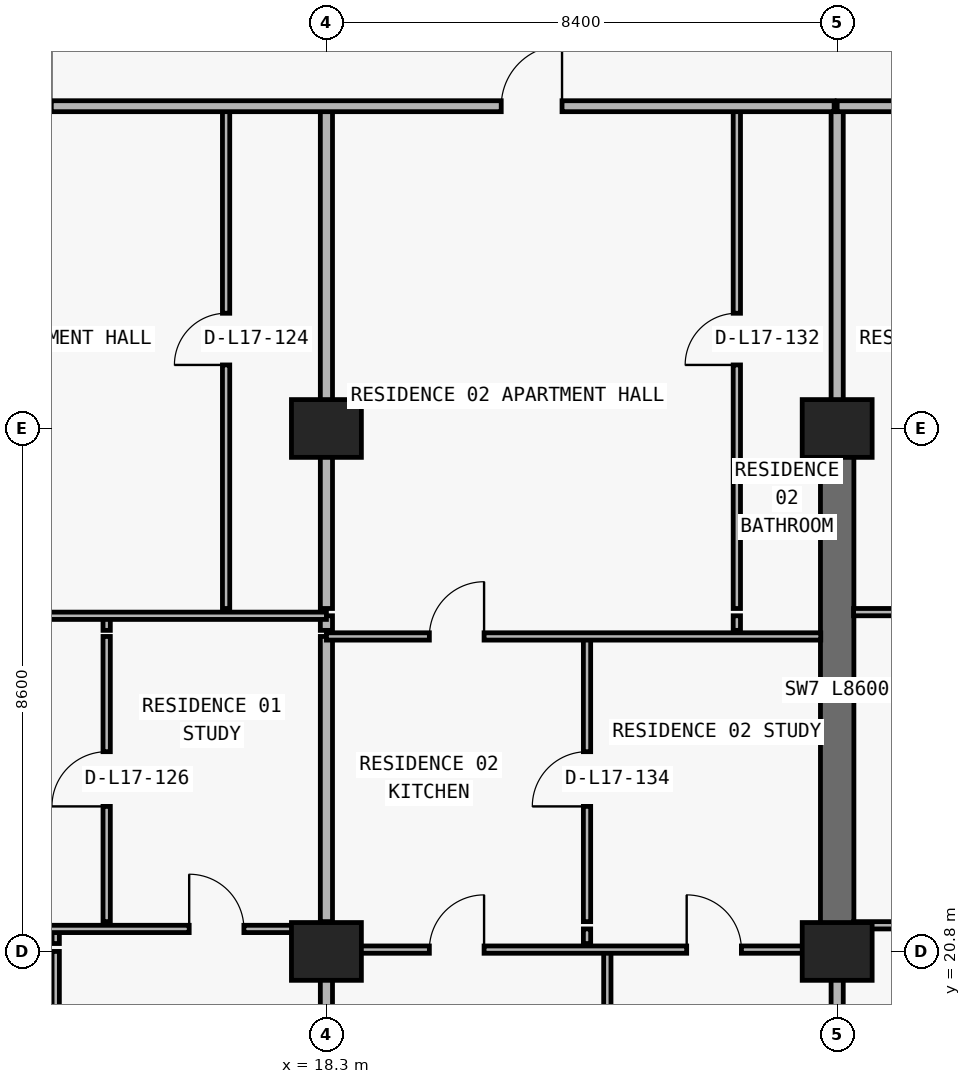
"""IFC4 building model, lengths in metres.
Left out: names, types, materials, properties, quantities, classifications, styles, units other than length and angle.
Written with IfcOpenShell. Run it as: python <this file> out.ifc"""

import sys

from ifc_helpers import new_model, si_unit, direction, frame, frame_2d, origin, origin_2d, place, context, subcontext, project, spatial, rectangle, extrude, element, fill, save


model = new_model("IFC4")
c1 = context("Model", 3, precision=1e-05, world=origin(), true_north=direction((0.0, 1.0)))
c2 = subcontext(c1, "Body", "Model", "MODEL_VIEW")
j1 = project(units=[si_unit("LENGTHUNIT", "METRE"), si_unit("PLANEANGLEUNIT", "RADIAN")], contexts=[c1])
p1 = place(None, origin())
s1 = spatial("IfcSite", under=j1, at=p1, CompositionType="ELEMENT")
p2 = place(p1, origin())
s2 = spatial("IfcBuilding", under=s1, at=p2, CompositionType="ELEMENT")
p3 = place(p2, frame((0.0, 0.0, 66.3)))
s3 = spatial("IfcBuildingStorey", under=s2, at=p3, CompositionType="ELEMENT", Elevation=66.3)
for number, where, z_axis, x_axis in (
    (1, (18.3, 20.8, 0.0), (0.0, 0.0, 1.0), (1.0, 0.0, 0.0)),
    (2, (26.7, 20.8, 0.0), (0.0, 0.0, 1.0), (1.0, 0.0, 0.0)),
    (3, (18.3, 29.4, 0.0), (0.0, 0.0, 1.0), (1.0, 0.0, 0.0)),
    (4, (26.7, 29.4, 0.0), (0.0, 0.0, 1.0), (1.0, 0.0, 0.0)),
):
    element("IfcColumn", number, at=place(p3, frame(where, z_axis=z_axis, x_axis=x_axis)), inside=s3, PredefinedType="COLUMN", context=c2, shape_type="SweptSolid", body=[
        extrude(rectangle(XDim=1.15, YDim=0.95, at=origin_2d()), origin(), (0.0, 0.0, 1.0), 3.05),
    ])
p4 = place(p3, frame((26.7, 20.8, 0.0), z_axis=(0.0, 0.0, 1.0), x_axis=(0.0, 1.0, 0.0)))
e5 = element("IfcWall", 5, at=p4, inside=s3, PredefinedType="SHEAR", context=c2, shape_type="SweptSolid", body=[
    extrude(rectangle(XDim=8.6, YDim=0.55, at=frame_2d((4.3, 0.0))), origin(), (0.0, 0.0, 1.0), 3.05),
])
p5 = place(p3, frame((13.848, 6.24, 0.0), z_axis=(0.0, 0.0, 1.0), x_axis=(0.0, 1.0, 0.0)))
e6 = element("IfcWall", 6, at=p5, inside=s3, PredefinedType="PARTITIONING", context=c2, shape_type="SweptSolid", body=[
    extrude(rectangle(XDim=14.56, YDim=0.12, at=frame_2d((7.28, 0.0))), origin(), (0.0, 0.0, 1.0), 2.423),
])
p6 = place(p3, frame((13.848, 20.93, 0.0), z_axis=(0.0, 0.0, 1.0), x_axis=(0.0, 1.0, 0.0)))
e7 = element("IfcWall", 7, at=p6, inside=s3, PredefinedType="PARTITIONING", context=c2, shape_type="SweptSolid", body=[
    extrude(rectangle(XDim=0.24, YDim=0.12, at=frame_2d((0.12, 0.0))), origin(), (0.0, 0.0, 1.0), 2.423),
])
p7 = place(p3, frame((14.686, 21.29, 0.0), z_axis=(0.0, 0.0, 1.0), x_axis=(0.0, 1.0, 0.0)))
e8 = element("IfcWall", 8, at=p7, inside=s3, PredefinedType="PARTITIONING", context=c2, shape_type="SweptSolid", body=[
    extrude(rectangle(XDim=4.69, YDim=0.12, at=frame_2d((2.345, 0.0))), origin(), (0.0, 0.0, 1.0), 3.05),
])
p8 = place(p7, frame((1.895, 0.0, 0.0)))
e9 = element("IfcOpeningElement", 9, at=p8, cuts=e8, PredefinedType="OPENING", context=c2, shape_type="SweptSolid", body=[
    extrude(rectangle(XDim=0.9, YDim=2.15, at=frame_2d((0.45, 1.075))), frame((0.0, 0.07, 0.0), z_axis=(0.0, -1.0, 0.0), x_axis=(1.0, 0.0, 0.0)), (0.0, 0.0, 1.0), 0.14),
])
p9 = place(p3, frame((14.686, 26.08, 0.0), z_axis=(0.0, 0.0, 1.0), x_axis=(0.0, 1.0, 0.0)))
e10 = element("IfcWall", 10, at=p9, inside=s3, PredefinedType="PARTITIONING", context=c2, shape_type="SweptSolid", body=[
    extrude(rectangle(XDim=0.24, YDim=0.12, at=frame_2d((0.12, 0.0))), origin(), (0.0, 0.0, 1.0), 3.05),
])
p10 = place(p3, frame((16.65, 26.44, 0.0), z_axis=(0.0, 0.0, 1.0), x_axis=(0.0, 1.0, 0.0)))
e11 = element("IfcWall", 11, at=p10, inside=s3, PredefinedType="PARTITIONING", context=c2, shape_type="SweptSolid", body=[
    extrude(rectangle(XDim=8.26, YDim=0.12, at=frame_2d((4.13, 0.0))), origin(), (0.0, 0.0, 1.0), 3.05),
])
p11 = place(p10, frame((4.005, 0.0, 0.0)))
e12 = element("IfcOpeningElement", 12, at=p11, cuts=e11, PredefinedType="OPENING", context=c2, shape_type="SweptSolid", body=[
    extrude(rectangle(XDim=0.85, YDim=2.1, at=frame_2d((0.425, 1.05))), frame((0.0, 0.07, 0.0), z_axis=(0.0, -1.0, 0.0), x_axis=(1.0, 0.0, 0.0)), (0.0, 0.0, 1.0), 0.14),
])
p12 = place(p3, frame((18.3, 6.24, 0.0), z_axis=(0.0, 0.0, 1.0), x_axis=(0.0, 1.0, 0.0)))
e13 = element("IfcWall", 13, at=p12, inside=s3, PredefinedType="PARTITIONING", context=c2, shape_type="SweptSolid", body=[
    extrude(rectangle(XDim=14.56, YDim=0.2, at=frame_2d((7.28, 0.0))), origin(), (0.0, 0.0, 1.0), 2.11),
])
p13 = place(p3, frame((18.3, 20.93, 0.0), z_axis=(0.0, 0.0, 1.0), x_axis=(0.0, 1.0, 0.0)))
e14 = element("IfcWall", 14, at=p13, inside=s3, PredefinedType="PARTITIONING", context=c2, shape_type="SweptSolid", body=[
    extrude(rectangle(XDim=0.24, YDim=0.2, at=frame_2d((0.12, 0.0))), origin(), (0.0, 0.0, 1.0), 3.05),
])
p14 = place(p3, frame((18.3, 21.29, 0.0), z_axis=(0.0, 0.0, 1.0), x_axis=(0.0, 1.0, 0.0)))
e15 = element("IfcWall", 15, at=p14, inside=s3, PredefinedType="PARTITIONING", context=c2, shape_type="SweptSolid", body=[
    extrude(rectangle(XDim=4.69, YDim=0.2, at=frame_2d((2.345, 0.0))), origin(), (0.0, 0.0, 1.0), 2.11),
])
p15 = place(p3, frame((18.3, 26.08, 0.0), z_axis=(0.0, 0.0, 1.0), x_axis=(0.0, 1.0, 0.0)))
e16 = element("IfcWall", 16, at=p15, inside=s3, PredefinedType="PARTITIONING", context=c2, shape_type="SweptSolid", body=[
    extrude(rectangle(XDim=0.24, YDim=0.2, at=frame_2d((0.12, 0.0))), origin(), (0.0, 0.0, 1.0), 2.11),
])
p16 = place(p3, frame((18.3, 26.44, 0.0), z_axis=(0.0, 0.0, 1.0), x_axis=(0.0, 1.0, 0.0)))
e17 = element("IfcWall", 17, at=p16, inside=s3, PredefinedType="PARTITIONING", context=c2, shape_type="SweptSolid", body=[
    extrude(rectangle(XDim=8.26, YDim=0.2, at=frame_2d((4.13, 0.0))), origin(), (0.0, 0.0, 1.0), 2.11),
])
p17 = place(p3, frame((22.586, 20.93, 0.0), z_axis=(0.0, 0.0, 1.0), x_axis=(0.0, 1.0, 0.0)))
e18 = element("IfcWall", 18, at=p17, inside=s3, PredefinedType="PARTITIONING", context=c2, shape_type="SweptSolid", body=[
    extrude(rectangle(XDim=0.24, YDim=0.12, at=frame_2d((0.12, 0.0))), origin(), (0.0, 0.0, 1.0), 2.423),
])
p18 = place(p3, frame((22.586, 21.29, 0.0), z_axis=(0.0, 0.0, 1.0), x_axis=(0.0, 1.0, 0.0)))
e19 = element("IfcWall", 19, at=p18, inside=s3, PredefinedType="PARTITIONING", context=c2, shape_type="SweptSolid", body=[
    extrude(rectangle(XDim=4.69, YDim=0.12, at=frame_2d((2.345, 0.0))), origin(), (0.0, 0.0, 1.0), 2.423),
])
p19 = place(p18, frame((1.895, 0.0, 0.0)))
e20 = element("IfcOpeningElement", 20, at=p19, cuts=e19, PredefinedType="OPENING", context=c2, shape_type="SweptSolid", body=[
    extrude(rectangle(XDim=0.9, YDim=2.15, at=frame_2d((0.45, 1.075))), frame((0.0, 0.07, 0.0), z_axis=(0.0, -1.0, 0.0), x_axis=(1.0, 0.0, 0.0)), (0.0, 0.0, 1.0), 0.14),
])
p20 = place(p3, frame((22.92, 6.24, 0.0), z_axis=(0.0, 0.0, 1.0), x_axis=(0.0, 1.0, 0.0)))
e21 = element("IfcWall", 21, at=p20, inside=s3, PredefinedType="PARTITIONING", context=c2, shape_type="SweptSolid", body=[
    extrude(rectangle(XDim=14.56, YDim=0.12, at=frame_2d((7.28, 0.0))), origin(), (0.0, 0.0, 1.0), 3.05),
])
p21 = place(p3, frame((25.05, 26.08, 0.0), z_axis=(0.0, 0.0, 1.0), x_axis=(0.0, 1.0, 0.0)))
e22 = element("IfcWall", 22, at=p21, inside=s3, PredefinedType="PARTITIONING", context=c2, shape_type="SweptSolid", body=[
    extrude(rectangle(XDim=0.24, YDim=0.12, at=frame_2d((0.12, 0.0))), origin(), (0.0, 0.0, 1.0), 3.05),
])
p22 = place(p3, frame((25.05, 26.44, 0.0), z_axis=(0.0, 0.0, 1.0), x_axis=(0.0, 1.0, 0.0)))
e23 = element("IfcWall", 23, at=p22, inside=s3, PredefinedType="PARTITIONING", context=c2, shape_type="SweptSolid", body=[
    extrude(rectangle(XDim=8.26, YDim=0.12, at=frame_2d((4.13, 0.0))), origin(), (0.0, 0.0, 1.0), 3.05),
])
p23 = place(p22, frame((4.005, 0.0, 0.0)))
e24 = element("IfcOpeningElement", 24, at=p23, cuts=e23, PredefinedType="OPENING", context=c2, shape_type="SweptSolid", body=[
    extrude(rectangle(XDim=0.85, YDim=2.1, at=frame_2d((0.425, 1.05))), frame((0.0, 0.07, 0.0), z_axis=(0.0, -1.0, 0.0), x_axis=(1.0, 0.0, 0.0)), (0.0, 0.0, 1.0), 0.14),
])
p24 = place(p3, frame((26.7, 6.24, 0.0), z_axis=(0.0, 0.0, 1.0), x_axis=(0.0, 1.0, 0.0)))
e25 = element("IfcWall", 25, at=p24, inside=s3, PredefinedType="PARTITIONING", context=c2, shape_type="SweptSolid", body=[
    extrude(rectangle(XDim=14.555, YDim=0.2, at=frame_2d((7.277, 0.0))), origin(), (0.0, 0.0, 1.0), 2.11),
])
p25 = place(p3, frame((26.7, 29.405, 0.0), z_axis=(0.0, 0.0, 1.0), x_axis=(0.0, 1.0, 0.0)))
e26 = element("IfcWall", 26, at=p25, inside=s3, PredefinedType="PARTITIONING", context=c2, shape_type="SweptSolid", body=[
    extrude(rectangle(XDim=5.295, YDim=0.2, at=frame_2d((2.647, 0.0))), origin(), (0.0, 0.0, 1.0), 2.335),
])
p26 = place(p3, frame((18.3, 20.83, 0.0), z_axis=(0.0, 0.0, 1.0), x_axis=(1.0, 0.0, 0.0)))
e27 = element("IfcWall", 27, at=p26, inside=s3, PredefinedType="PARTITIONING", context=c2, shape_type="SweptSolid", body=[
    extrude(rectangle(XDim=8.13, YDim=0.12, at=frame_2d((4.065, 0.0))), origin(), (0.0, 0.0, 1.0), 2.11),
])
p27 = place(p26, frame((1.693, 0.0, 0.0)))
e28 = element("IfcOpeningElement", 28, at=p27, cuts=e27, PredefinedType="OPENING", context=c2, shape_type="SweptSolid", body=[
    extrude(rectangle(XDim=0.9, YDim=2.06, at=frame_2d((0.45, 1.03))), frame((0.0, 0.07, 0.0), z_axis=(0.0, -1.0, 0.0), x_axis=(1.0, 0.0, 0.0)), (0.0, 0.0, 1.0), 0.14),
])
p28 = place(p26, frame((5.925, 0.0, 0.0)))
e29 = element("IfcOpeningElement", 29, at=p28, cuts=e27, PredefinedType="OPENING", context=c2, shape_type="SweptSolid", body=[
    extrude(rectangle(XDim=0.9, YDim=2.06, at=frame_2d((0.45, 1.03))), frame((0.0, 0.07, 0.0), z_axis=(0.0, -1.0, 0.0), x_axis=(1.0, 0.0, 0.0)), (0.0, 0.0, 1.0), 0.14),
])
p29 = place(p3, frame((9.9, 21.17, 0.0), z_axis=(0.0, 0.0, 1.0), x_axis=(1.0, 0.0, 0.0)))
e30 = element("IfcWall", 30, at=p29, inside=s3, PredefinedType="PARTITIONING", context=c2, shape_type="SweptSolid", body=[
    extrude(rectangle(XDim=8.4, YDim=0.12, at=frame_2d((4.2, 0.0))), origin(), (0.0, 0.0, 1.0), 3.05),
])
p30 = place(p29, frame((1.524, 0.0, 0.0)))
e31 = element("IfcOpeningElement", 31, at=p30, cuts=e30, PredefinedType="OPENING", context=c2, shape_type="SweptSolid", body=[
    extrude(rectangle(XDim=0.9, YDim=2.15, at=frame_2d((0.45, 1.075))), frame((0.0, 0.07, 0.0), z_axis=(0.0, -1.0, 0.0), x_axis=(1.0, 0.0, 0.0)), (0.0, 0.0, 1.0), 0.14),
])
p31 = place(p29, frame((6.143, 0.0, 0.0)))
e32 = element("IfcOpeningElement", 32, at=p31, cuts=e30, PredefinedType="OPENING", context=c2, shape_type="SweptSolid", body=[
    extrude(rectangle(XDim=0.9, YDim=2.15, at=frame_2d((0.45, 1.075))), frame((0.0, 0.07, 0.0), z_axis=(0.0, -1.0, 0.0), x_axis=(1.0, 0.0, 0.0)), (0.0, 0.0, 1.0), 0.14),
])
p32 = place(p3, frame((26.97, 21.23, 0.0), z_axis=(0.0, 0.0, 1.0), x_axis=(1.0, 0.0, 0.0)))
e33 = element("IfcWall", 33, at=p32, inside=s3, PredefinedType="PARTITIONING", context=c2, shape_type="SweptSolid", body=[
    extrude(rectangle(XDim=8.13, YDim=0.12, at=frame_2d((4.065, 0.0))), origin(), (0.0, 0.0, 1.0), 3.05),
])
p33 = place(p32, frame((1.389, 0.0, 0.0)))
e34 = element("IfcOpeningElement", 34, at=p33, cuts=e33, PredefinedType="OPENING", context=c2, shape_type="SweptSolid", body=[
    extrude(rectangle(XDim=0.9, YDim=2.15, at=frame_2d((0.45, 1.075))), frame((0.0, 0.07, 0.0), z_axis=(0.0, -1.0, 0.0), x_axis=(1.0, 0.0, 0.0)), (0.0, 0.0, 1.0), 0.14),
])
p34 = place(p32, frame((5.748, 0.0, 0.0)))
e35 = element("IfcOpeningElement", 35, at=p34, cuts=e33, PredefinedType="OPENING", context=c2, shape_type="SweptSolid", body=[
    extrude(rectangle(XDim=0.9, YDim=2.15, at=frame_2d((0.45, 1.075))), frame((0.0, 0.07, 0.0), z_axis=(0.0, -1.0, 0.0), x_axis=(1.0, 0.0, 0.0)), (0.0, 0.0, 1.0), 0.14),
])
p35 = place(p3, frame((18.3, 25.98, 0.0), z_axis=(0.0, 0.0, 1.0), x_axis=(1.0, 0.0, 0.0)))
e36 = element("IfcWall", 36, at=p35, inside=s3, PredefinedType="PARTITIONING", context=c2, shape_type="SweptSolid", body=[
    extrude(rectangle(XDim=8.13, YDim=0.12, at=frame_2d((4.065, 0.0))), origin(), (0.0, 0.0, 1.0), 3.05),
])
p36 = place(p35, frame((1.693, 0.0, 0.0)))
e37 = element("IfcOpeningElement", 37, at=p36, cuts=e36, PredefinedType="OPENING", context=c2, shape_type="SweptSolid", body=[
    extrude(rectangle(XDim=0.9, YDim=2.15, at=frame_2d((0.45, 1.075))), frame((0.0, 0.07, 0.0), z_axis=(0.0, -1.0, 0.0), x_axis=(1.0, 0.0, 0.0)), (0.0, 0.0, 1.0), 0.14),
])
p37 = place(p3, frame((9.9, 26.32, 0.0), z_axis=(0.0, 0.0, 1.0), x_axis=(1.0, 0.0, 0.0)))
e38 = element("IfcWall", 38, at=p37, inside=s3, PredefinedType="PARTITIONING", context=c2, shape_type="SweptSolid", body=[
    extrude(rectangle(XDim=8.4, YDim=0.12, at=frame_2d((4.2, 0.0))), origin(), (0.0, 0.0, 1.0), 3.05),
])
p38 = place(p37, frame((1.943, 0.0, 0.0)))
e39 = element("IfcOpeningElement", 39, at=p38, cuts=e38, PredefinedType="OPENING", context=c2, shape_type="SweptSolid", body=[
    extrude(rectangle(XDim=0.9, YDim=2.15, at=frame_2d((0.45, 1.075))), frame((0.0, 0.07, 0.0), z_axis=(0.0, -1.0, 0.0), x_axis=(1.0, 0.0, 0.0)), (0.0, 0.0, 1.0), 0.14),
])
p39 = place(p3, frame((26.97, 26.38, 0.0), z_axis=(0.0, 0.0, 1.0), x_axis=(1.0, 0.0, 0.0)))
e40 = element("IfcWall", 40, at=p39, inside=s3, PredefinedType="PARTITIONING", context=c2, shape_type="SweptSolid", body=[
    extrude(rectangle(XDim=8.13, YDim=0.12, at=frame_2d((4.065, 0.0))), origin(), (0.0, 0.0, 1.0), 3.05),
])
p40 = place(p39, frame((1.683, 0.0, 0.0)))
e41 = element("IfcOpeningElement", 41, at=p40, cuts=e40, PredefinedType="OPENING", context=c2, shape_type="SweptSolid", body=[
    extrude(rectangle(XDim=0.9, YDim=2.15, at=frame_2d((0.45, 1.075))), frame((0.0, 0.07, 0.0), z_axis=(0.0, -1.0, 0.0), x_axis=(1.0, 0.0, 0.0)), (0.0, 0.0, 1.0), 0.14),
])
p41 = place(p3, frame((5.105, 34.7, 0.0), z_axis=(0.0, 0.0, 1.0), x_axis=(1.0, 0.0, 0.0)))
e42 = element("IfcWall", 42, at=p41, inside=s3, PredefinedType="PARTITIONING", context=c2, shape_type="SweptSolid", body=[
    extrude(rectangle(XDim=21.545, YDim=0.18, at=frame_2d((10.772, 0.0))), origin(), (0.0, 0.0, 1.0), 3.05),
])
p42 = place(p41, frame((7.67, 0.0, 0.0)))
e43 = element("IfcOpeningElement", 43, at=p42, cuts=e42, PredefinedType="OPENING", context=c2, shape_type="SweptSolid", body=[
    extrude(rectangle(XDim=1.0, YDim=2.2, at=frame_2d((0.5, 1.1))), frame((0.0, 0.1, 0.0), z_axis=(0.0, -1.0, 0.0), x_axis=(1.0, 0.0, 0.0)), (0.0, 0.0, 1.0), 0.2),
])
p43 = place(p41, frame((16.07, 0.0, 0.0)))
e44 = element("IfcOpeningElement", 44, at=p43, cuts=e42, PredefinedType="OPENING", context=c2, shape_type="SweptSolid", body=[
    extrude(rectangle(XDim=1.0, YDim=2.2, at=frame_2d((0.5, 1.1))), frame((0.0, 0.1, 0.0), z_axis=(0.0, -1.0, 0.0), x_axis=(1.0, 0.0, 0.0)), (0.0, 0.0, 1.0), 0.2),
])
p44 = place(p3, frame((26.7, 34.7, 0.0), z_axis=(0.0, 0.0, 1.0), x_axis=(1.0, 0.0, 0.0)))
e45 = element("IfcWall", 45, at=p44, inside=s3, PredefinedType="PARTITIONING", context=c2, shape_type="SweptSolid", body=[
    extrude(rectangle(XDim=46.0, YDim=0.18, at=frame_2d((23.0, 0.0))), origin(), (0.0, 0.0, 1.0), 3.05),
])
p45 = place(p44, frame((2.875, 0.0, 0.0)))
e46 = element("IfcOpeningElement", 46, at=p45, cuts=e45, PredefinedType="OPENING", context=c2, shape_type="SweptSolid", body=[
    extrude(rectangle(XDim=1.0, YDim=2.2, at=frame_2d((0.5, 1.1))), frame((0.0, 0.1, 0.0), z_axis=(0.0, -1.0, 0.0), x_axis=(1.0, 0.0, 0.0)), (0.0, 0.0, 1.0), 0.2),
])
p46 = place(p44, frame((10.875, 0.0, 0.0)))
e47 = element("IfcOpeningElement", 47, at=p46, cuts=e45, PredefinedType="OPENING", context=c2, shape_type="SweptSolid", body=[
    extrude(rectangle(XDim=1.0, YDim=2.2, at=frame_2d((0.5, 1.1))), frame((0.0, 0.1, 0.0), z_axis=(0.0, -1.0, 0.0), x_axis=(1.0, 0.0, 0.0)), (0.0, 0.0, 1.0), 0.2),
])
p47 = place(p44, frame((18.875, 0.0, 0.0)))
e48 = element("IfcOpeningElement", 48, at=p47, cuts=e45, PredefinedType="OPENING", context=c2, shape_type="SweptSolid", body=[
    extrude(rectangle(XDim=1.0, YDim=2.2, at=frame_2d((0.5, 1.1))), frame((0.0, 0.1, 0.0), z_axis=(0.0, -1.0, 0.0), x_axis=(1.0, 0.0, 0.0)), (0.0, 0.0, 1.0), 0.2),
])
p48 = place(p44, frame((27.275, 0.0, 0.0)))
e49 = element("IfcOpeningElement", 49, at=p48, cuts=e45, PredefinedType="OPENING", context=c2, shape_type="SweptSolid", body=[
    extrude(rectangle(XDim=1.0, YDim=2.2, at=frame_2d((0.5, 1.1))), frame((0.0, 0.1, 0.0), z_axis=(0.0, -1.0, 0.0), x_axis=(1.0, 0.0, 0.0)), (0.0, 0.0, 1.0), 0.2),
])
p49 = place(p44, frame((35.675, 0.0, 0.0)))
e50 = element("IfcOpeningElement", 50, at=p49, cuts=e45, PredefinedType="OPENING", context=c2, shape_type="SweptSolid", body=[
    extrude(rectangle(XDim=1.0, YDim=2.2, at=frame_2d((0.5, 1.1))), frame((0.0, 0.1, 0.0), z_axis=(0.0, -1.0, 0.0), x_axis=(1.0, 0.0, 0.0)), (0.0, 0.0, 1.0), 0.2),
])
p50 = place(p11, origin())
e51 = element("IfcDoor", 51, at=p50, inside=s3, OperationType="SINGLE_SWING_LEFT", PredefinedType="DOOR", context=c2, shape_type="SweptSolid", body=[
    extrude(rectangle(XDim=0.85, YDim=2.1, at=frame_2d((0.425, 1.05))), frame((0.0, 0.025, 0.0), z_axis=(0.0, -1.0, 0.0), x_axis=(1.0, 0.0, 0.0)), (0.0, 0.0, 1.0), 0.05),
])
fill(e12, e51)
p51 = place(p8, origin())
e52 = element("IfcDoor", 52, at=p51, inside=s3, OperationType="SINGLE_SWING_LEFT", PredefinedType="DOOR", context=c2, shape_type="SweptSolid", body=[
    extrude(rectangle(XDim=0.9, YDim=2.15, at=frame_2d((0.45, 1.075))), frame((0.0, 0.025, 0.0), z_axis=(0.0, -1.0, 0.0), x_axis=(1.0, 0.0, 0.0)), (0.0, 0.0, 1.0), 0.05),
])
fill(e9, e52)
p52 = place(p31, origin())
e53 = element("IfcDoor", 53, at=p52, inside=s3, OperationType="SINGLE_SWING_LEFT", PredefinedType="DOOR", context=c2, shape_type="SweptSolid", body=[
    extrude(rectangle(XDim=0.9, YDim=2.15, at=frame_2d((0.45, 1.075))), frame((0.0, 0.025, 0.0), z_axis=(0.0, -1.0, 0.0), x_axis=(1.0, 0.0, 0.0)), (0.0, 0.0, 1.0), 0.05),
])
fill(e32, e53)
p53 = place(p43, origin())
e54 = element("IfcDoor", 54, at=p53, inside=s3, OperationType="SINGLE_SWING_RIGHT", PredefinedType="DOOR", context=c2, shape_type="SweptSolid", body=[
    extrude(rectangle(XDim=1.0, YDim=2.2, at=frame_2d((0.5, 1.1))), frame((0.0, 0.025, 0.0), z_axis=(0.0, -1.0, 0.0), x_axis=(1.0, 0.0, 0.0)), (0.0, 0.0, 1.0), 0.05),
])
fill(e44, e54)
p54 = place(p23, origin())
e55 = element("IfcDoor", 55, at=p54, inside=s3, OperationType="SINGLE_SWING_LEFT", PredefinedType="DOOR", context=c2, shape_type="SweptSolid", body=[
    extrude(rectangle(XDim=0.85, YDim=2.1, at=frame_2d((0.425, 1.05))), frame((0.0, 0.025, 0.0), z_axis=(0.0, -1.0, 0.0), x_axis=(1.0, 0.0, 0.0)), (0.0, 0.0, 1.0), 0.05),
])
fill(e24, e55)
p55 = place(p36, origin())
e56 = element("IfcDoor", 56, at=p55, inside=s3, OperationType="SINGLE_SWING_RIGHT", PredefinedType="DOOR", context=c2, shape_type="SweptSolid", body=[
    extrude(rectangle(XDim=0.9, YDim=2.15, at=frame_2d((0.45, 1.075))), frame((0.0, 0.025, 0.0), z_axis=(0.0, -1.0, 0.0), x_axis=(1.0, 0.0, 0.0)), (0.0, 0.0, 1.0), 0.05),
])
fill(e37, e56)
p56 = place(p19, origin())
e57 = element("IfcDoor", 57, at=p56, inside=s3, OperationType="SINGLE_SWING_LEFT", PredefinedType="DOOR", context=c2, shape_type="SweptSolid", body=[
    extrude(rectangle(XDim=0.9, YDim=2.15, at=frame_2d((0.45, 1.075))), frame((0.0, 0.025, 0.0), z_axis=(0.0, -1.0, 0.0), x_axis=(1.0, 0.0, 0.0)), (0.0, 0.0, 1.0), 0.05),
])
fill(e20, e57)
p57 = place(p27, origin())
e58 = element("IfcDoor", 58, at=p57, inside=s3, OperationType="SINGLE_SWING_RIGHT", PredefinedType="DOOR", context=c2, shape_type="SweptSolid", body=[
    extrude(rectangle(XDim=0.9, YDim=2.06, at=frame_2d((0.45, 1.03))), frame((0.0, 0.025, 0.0), z_axis=(0.0, -1.0, 0.0), x_axis=(1.0, 0.0, 0.0)), (0.0, 0.0, 1.0), 0.05),
])
fill(e28, e58)
p58 = place(p28, origin())
e59 = element("IfcDoor", 59, at=p58, inside=s3, OperationType="SINGLE_SWING_LEFT", PredefinedType="DOOR", context=c2, shape_type="SweptSolid", body=[
    extrude(rectangle(XDim=0.9, YDim=2.06, at=frame_2d((0.45, 1.03))), frame((0.0, 0.025, 0.0), z_axis=(0.0, -1.0, 0.0), x_axis=(1.0, 0.0, 0.0)), (0.0, 0.0, 1.0), 0.05),
])
fill(e29, e59)
save(model, sys.argv[1])
